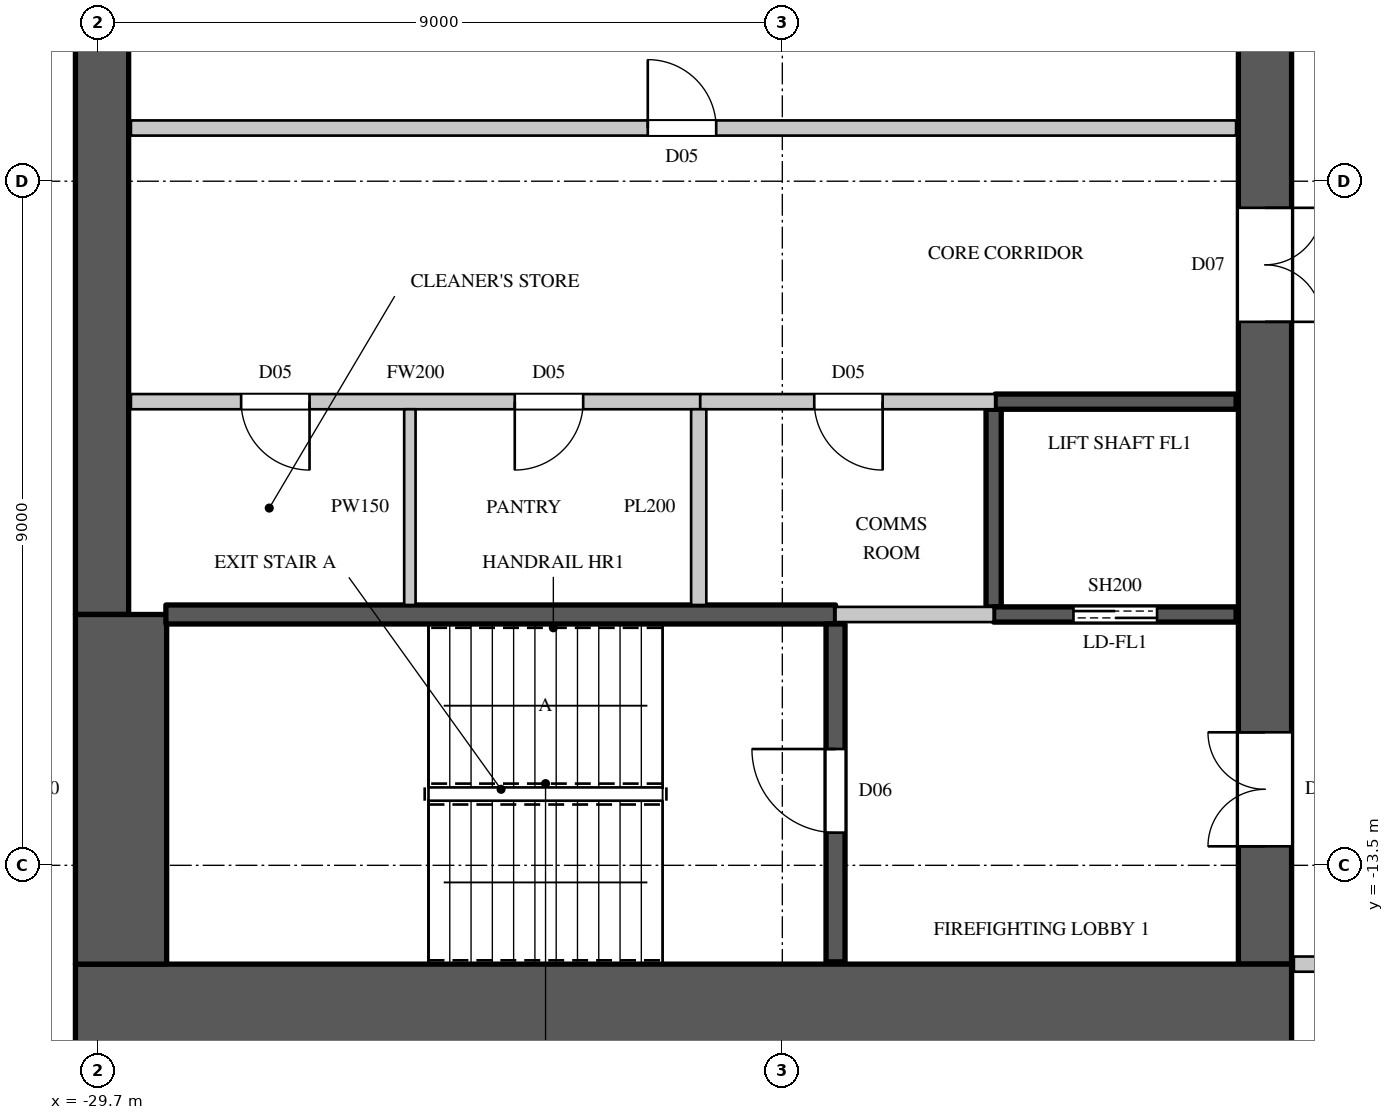
"""IFC4 building model, lengths in metres.
Left out: names, types, materials, properties, quantities, classifications, styles, units other than length and angle.
Written with IfcOpenShell. Run it as: python <this file> out.ifc"""

import sys

from ifc_helpers import new_model, si_unit, direction, frame, frame_2d, origin, place, context, subcontext, project, spatial, rectangle, extrude, element, fill, save


model = new_model("IFC4")
c1 = context("Model", 3, precision=1e-05, world=origin(), true_north=direction((0.0, 1.0)))
c2 = subcontext(c1, "Body", "Model", "MODEL_VIEW")
j1 = project(units=[si_unit("LENGTHUNIT", "METRE"), si_unit("PLANEANGLEUNIT", "RADIAN")], contexts=[c1])
p1 = place(None, origin())
s1 = spatial("IfcSite", under=j1, at=p1, CompositionType="ELEMENT")
p2 = place(p1, origin())
s2 = spatial("IfcBuilding", under=s1, at=p2, CompositionType="ELEMENT")
p3 = place(p2, frame((0.0, 0.0, 304.9)))
s3 = spatial("IfcBuildingStorey", under=s2, at=p3, CompositionType="ELEMENT", Elevation=304.9)
p4 = place(p3, frame((-30.0, -15.4, 0.0), z_axis=(0.0, 0.0, 1.0), x_axis=(1.0, 0.0, 0.0)))
e1 = element("IfcWall", 1, at=p4, inside=s3, PredefinedType="SHEAR", context=c2, shape_type="SweptSolid", body=[
    extrude(rectangle(XDim=16.0, YDim=1.2, at=frame_2d((8.0, 0.0))), origin(), (0.0, 0.0, 1.0), 4.1),
])
p5 = place(p3, frame((-14.35, -14.8, 0.0), z_axis=(0.0, 0.0, 1.0), x_axis=(0.0, 1.0, 0.0)))
e2 = element("IfcWall", 2, at=p5, inside=s3, PredefinedType="SHEAR", context=c2, shape_type="SweptSolid", body=[
    extrude(rectangle(XDim=29.6, YDim=0.7, at=frame_2d((14.8, 0.0))), origin(), (0.0, 0.0, 1.0), 4.1),
])
p6 = place(p5, frame((1.55, 0.0, 0.0)))
e3 = element("IfcOpeningElement", 3, at=p6, cuts=e2, PredefinedType="OPENING", context=c2, shape_type="SweptSolid", body=[
    extrude(rectangle(XDim=1.5, YDim=2.4, at=frame_2d((0.75, 1.2))), frame((0.0, 0.36, 0.0), z_axis=(0.0, -1.0, 0.0), x_axis=(1.0, 0.0, 0.0)), (0.0, 0.0, 1.0), 0.72),
])
p7 = place(p5, frame((26.55, 0.0, 0.0)))
e4 = element("IfcOpeningElement", 4, at=p7, cuts=e2, PredefinedType="OPENING", context=c2, shape_type="SweptSolid", body=[
    extrude(rectangle(XDim=1.5, YDim=2.4, at=frame_2d((0.75, 1.2))), frame((0.0, 0.36, 0.0), z_axis=(0.0, -1.0, 0.0), x_axis=(1.0, 0.0, 0.0)), (0.0, 0.0, 1.0), 0.72),
])
p8 = place(p5, frame((8.45, 0.0, 0.0)))
e5 = element("IfcOpeningElement", 5, at=p8, cuts=e2, PredefinedType="OPENING", context=c2, shape_type="SweptSolid", body=[
    extrude(rectangle(XDim=1.5, YDim=2.4, at=frame_2d((0.75, 1.2))), frame((0.0, 0.36, 0.0), z_axis=(0.0, -1.0, 0.0), x_axis=(1.0, 0.0, 0.0)), (0.0, 0.0, 1.0), 0.72),
])
p9 = place(p5, frame((19.65, 0.0, 0.0)))
e6 = element("IfcOpeningElement", 6, at=p9, cuts=e2, PredefinedType="OPENING", context=c2, shape_type="SweptSolid", body=[
    extrude(rectangle(XDim=1.5, YDim=2.4, at=frame_2d((0.75, 1.2))), frame((0.0, 0.36, 0.0), z_axis=(0.0, -1.0, 0.0), x_axis=(1.0, 0.0, 0.0)), (0.0, 0.0, 1.0), 0.72),
])
p10 = place(p5, frame((14.5, 0.0, 0.0)))
e7 = element("IfcOpeningElement", 7, at=p10, cuts=e2, PredefinedType="OPENING", context=c2, shape_type="SweptSolid", body=[
    extrude(rectangle(XDim=0.6, YDim=2.0, at=frame_2d((0.3, 1.0))), frame((0.0, 0.36, 0.0), z_axis=(0.0, -1.0, 0.0), x_axis=(1.0, 0.0, 0.0)), (0.0, 0.0, 1.0), 0.72),
])
p11 = place(p3, frame((-29.65, -10.2, 0.0), z_axis=(0.0, 0.0, 1.0), x_axis=(0.0, 1.0, 0.0)))
e8 = element("IfcWall", 8, at=p11, inside=s3, PredefinedType="SHEAR", context=c2, shape_type="SweptSolid", body=[
    extrude(rectangle(XDim=20.4, YDim=0.7, at=frame_2d((10.2, 0.0))), origin(), (0.0, 0.0, 1.0), 4.1),
])
p12 = place(p3, frame((-29.4, -14.8, 0.0), z_axis=(0.0, 0.0, 1.0), x_axis=(0.0, 1.0, 0.0)))
e9 = element("IfcWall", 9, at=p12, inside=s3, PredefinedType="SHEAR", context=c2, shape_type="SweptSolid", body=[
    extrude(rectangle(XDim=4.6, YDim=1.2, at=frame_2d((2.3, 0.0))), origin(), (0.0, 0.0, 1.0), 4.1),
])
p13 = place(p3, frame((-29.27, -7.4, 0.0), z_axis=(0.0, 0.0, 1.0), x_axis=(1.0, 0.0, 0.0)))
e10 = element("IfcWall", 10, at=p13, inside=s3, PredefinedType="PARTITIONING", context=c2, shape_type="SweptSolid", body=[
    extrude(rectangle(XDim=7.49, YDim=0.2, at=frame_2d((3.745, 0.0))), origin(), (0.0, 0.0, 1.0), 3.8),
])
p14 = place(p13, frame((1.45, 0.0, 0.0)))
e11 = element("IfcOpeningElement", 11, at=p14, cuts=e10, PredefinedType="OPENING", context=c2, shape_type="SweptSolid", body=[
    extrude(rectangle(XDim=0.9, YDim=2.2, at=frame_2d((0.45, 1.1))), frame((0.0, 0.11, 0.0), z_axis=(0.0, -1.0, 0.0), x_axis=(1.0, 0.0, 0.0)), (0.0, 0.0, 1.0), 0.22),
])
p15 = place(p13, frame((5.05, 0.0, 0.0)))
e12 = element("IfcOpeningElement", 12, at=p15, cuts=e10, PredefinedType="OPENING", context=c2, shape_type="SweptSolid", body=[
    extrude(rectangle(XDim=0.9, YDim=2.2, at=frame_2d((0.45, 1.1))), frame((0.0, 0.11, 0.0), z_axis=(0.0, -1.0, 0.0), x_axis=(1.0, 0.0, 0.0)), (0.0, 0.0, 1.0), 0.22),
])
p16 = place(p3, frame((-29.27, -3.8, 0.0), z_axis=(0.0, 0.0, 1.0), x_axis=(1.0, 0.0, 0.0)))
e13 = element("IfcWall", 13, at=p16, inside=s3, PredefinedType="PARTITIONING", context=c2, shape_type="SweptSolid", body=[
    extrude(rectangle(XDim=14.54, YDim=0.2, at=frame_2d((7.27, 0.0))), origin(), (0.0, 0.0, 1.0), 3.8),
])
p17 = place(p16, frame((6.8, 0.0, 0.0)))
e14 = element("IfcOpeningElement", 14, at=p17, cuts=e13, PredefinedType="OPENING", context=c2, shape_type="SweptSolid", body=[
    extrude(rectangle(XDim=0.9, YDim=2.2, at=frame_2d((0.45, 1.1))), frame((0.0, 0.11, 0.0), z_axis=(0.0, -1.0, 0.0), x_axis=(1.0, 0.0, 0.0)), (0.0, 0.0, 1.0), 0.22),
])
p18 = place(p3, frame((-13.97, -14.8, 0.0), z_axis=(0.0, 0.0, 1.0), x_axis=(1.0, 0.0, 0.0)))
e15 = element("IfcWall", 15, at=p18, inside=s3, PredefinedType="PARTITIONING", context=c2, shape_type="SweptSolid", body=[
    extrude(rectangle(XDim=2.87, YDim=0.2, at=frame_2d((1.435, 0.0))), origin(), (0.0, 0.0, 1.0), 3.8),
])
p19 = place(p3, frame((-25.6, -10.075, 0.0), z_axis=(0.0, 0.0, 1.0), x_axis=(0.0, 1.0, 0.0)))
e16 = element("IfcWall", 16, at=p19, inside=s3, PredefinedType="PARTITIONING", context=c2, shape_type="SweptSolid", body=[
    extrude(rectangle(XDim=2.575, YDim=0.15, at=frame_2d((1.288, 0.0))), origin(), (0.0, 0.0, 1.0), 3.8),
])
p20 = place(p3, frame((-21.78, -7.4, 0.0), z_axis=(0.0, 0.0, 1.0), x_axis=(1.0, 0.0, 0.0)))
e17 = element("IfcWall", 17, at=p20, inside=s3, PredefinedType="PARTITIONING", context=c2, shape_type="SweptSolid", body=[
    extrude(rectangle(XDim=3.88, YDim=0.2, at=frame_2d((1.94, 0.0))), origin(), (0.0, 0.0, 1.0), 3.8),
])
p21 = place(p20, frame((1.5, 0.0, 0.0)))
e18 = element("IfcOpeningElement", 18, at=p21, cuts=e17, PredefinedType="OPENING", context=c2, shape_type="SweptSolid", body=[
    extrude(rectangle(XDim=0.9, YDim=2.2, at=frame_2d((0.45, 1.1))), frame((0.0, 0.11, 0.0), z_axis=(0.0, -1.0, 0.0), x_axis=(1.0, 0.0, 0.0)), (0.0, 0.0, 1.0), 0.22),
])
p22 = place(p3, frame((-21.8, -10.075, 0.0), z_axis=(0.0, 0.0, 1.0), x_axis=(0.0, 1.0, 0.0)))
e19 = element("IfcWall", 19, at=p22, inside=s3, PredefinedType="PARTITIONING", context=c2, shape_type="SweptSolid", body=[
    extrude(rectangle(XDim=2.575, YDim=0.2, at=frame_2d((1.288, 0.0))), origin(), (0.0, 0.0, 1.0), 3.8),
])
p23 = place(p3, frame((-20.0, -10.2, 0.0), z_axis=(0.0, 0.0, 1.0), x_axis=(1.0, 0.0, 0.0)))
e20 = element("IfcWall", 20, at=p23, inside=s3, PredefinedType="PARTITIONING", context=c2, shape_type="SweptSolid", body=[
    extrude(rectangle(XDim=2.08, YDim=0.2, at=frame_2d((1.04, 0.0))), origin(), (0.0, 0.0, 1.0), 3.8),
])
p24 = place(p3, frame((-17.92, -10.1, 0.0), z_axis=(0.0, 0.0, 1.0), x_axis=(0.0, 1.0, 0.0)))
e21 = element("IfcWall", 21, at=p24, inside=s3, PredefinedType="SHEAR", context=c2, shape_type="SweptSolid", body=[
    extrude(rectangle(XDim=2.6, YDim=0.2, at=frame_2d((1.3, 0.0))), origin(), (0.0, 0.0, 1.0), 3.8),
])
p25 = place(p3, frame((-17.92, -10.2, 0.0), z_axis=(0.0, 0.0, 1.0), x_axis=(1.0, 0.0, 0.0)))
e22 = element("IfcWall", 22, at=p25, inside=s3, PredefinedType="SHEAR", context=c2, shape_type="SweptSolid", body=[
    extrude(rectangle(XDim=3.19, YDim=0.2, at=frame_2d((1.595, 0.0))), origin(), (0.0, 0.0, 1.0), 3.8),
])
p26 = place(p25, frame((1.05, 0.0, 0.0)))
e23 = element("IfcOpeningElement", 23, at=p26, cuts=e22, PredefinedType="OPENING", context=c2, shape_type="SweptSolid", body=[
    extrude(rectangle(XDim=1.1, YDim=2.2, at=frame_2d((0.55, 1.1))), frame((0.0, 0.11, 0.0), z_axis=(0.0, -1.0, 0.0), x_axis=(1.0, 0.0, 0.0)), (0.0, 0.0, 1.0), 0.22),
])
p27 = place(p3, frame((-17.9, -7.4, 0.0), z_axis=(0.0, 0.0, 1.0), x_axis=(1.0, 0.0, 0.0)))
e24 = element("IfcWall", 24, at=p27, inside=s3, PredefinedType="SHEAR", context=c2, shape_type="SweptSolid", body=[
    extrude(rectangle(XDim=3.17, YDim=0.2, at=frame_2d((1.585, 0.0))), origin(), (0.0, 0.0, 1.0), 3.8),
])
p28 = place(p3, frame((-28.81, -10.2, 0.0), z_axis=(0.0, 0.0, 1.0), x_axis=(1.0, 0.0, 0.0)))
e25 = element("IfcWall", 25, at=p28, inside=s3, PredefinedType="SHEAR", context=c2, shape_type="SweptSolid", body=[
    extrude(rectangle(XDim=8.81, YDim=0.25, at=frame_2d((4.405, 0.0))), origin(), (0.0, 0.0, 1.0), 3.8),
])
p29 = place(p3, frame((-20.0, -14.77, 0.0), z_axis=(0.0, 0.0, 1.0), x_axis=(0.0, 1.0, 0.0)))
e26 = element("IfcWall", 26, at=p29, inside=s3, PredefinedType="SHEAR", context=c2, shape_type="SweptSolid", body=[
    extrude(rectangle(XDim=4.445, YDim=0.25, at=frame_2d((2.223, 0.0))), origin(), (0.0, 0.0, 1.0), 3.8),
])
p30 = place(p29, frame((1.7, 0.0, 0.0)))
e27 = element("IfcOpeningElement", 27, at=p30, cuts=e26, PredefinedType="OPENING", context=c2, shape_type="SweptSolid", body=[
    extrude(rectangle(XDim=1.1, YDim=2.2, at=frame_2d((0.55, 1.1))), frame((0.0, 0.135, 0.0), z_axis=(0.0, -1.0, 0.0), x_axis=(1.0, 0.0, 0.0)), (0.0, 0.0, 1.0), 0.27),
])
p31 = place(p30, origin())
e28 = element("IfcDoor", 28, at=p31, inside=s3, OperationType="SINGLE_SWING_RIGHT", PredefinedType="DOOR", context=c2, shape_type="SweptSolid", body=[
    extrude(rectangle(XDim=1.1, YDim=2.2, at=frame_2d((0.55, 1.1))), frame((0.0, 0.025, 0.0), z_axis=(0.0, -1.0, 0.0), x_axis=(1.0, 0.0, 0.0)), (0.0, 0.0, 1.0), 0.05),
])
fill(e27, e28)
p32 = place(p14, origin())
e29 = element("IfcDoor", 29, at=p32, inside=s3, OperationType="SINGLE_SWING_LEFT", PredefinedType="DOOR", context=c2, shape_type="SweptSolid", body=[
    extrude(rectangle(XDim=0.9, YDim=2.2, at=frame_2d((0.45, 1.1))), frame((0.0, 0.025, 0.0), z_axis=(0.0, -1.0, 0.0), x_axis=(1.0, 0.0, 0.0)), (0.0, 0.0, 1.0), 0.05),
])
fill(e11, e29)
p33 = place(p15, origin())
e30 = element("IfcDoor", 30, at=p33, inside=s3, OperationType="SINGLE_SWING_RIGHT", PredefinedType="DOOR", context=c2, shape_type="SweptSolid", body=[
    extrude(rectangle(XDim=0.9, YDim=2.2, at=frame_2d((0.45, 1.1))), frame((0.0, 0.025, 0.0), z_axis=(0.0, -1.0, 0.0), x_axis=(1.0, 0.0, 0.0)), (0.0, 0.0, 1.0), 0.05),
])
fill(e12, e30)
p34 = place(p21, origin())
e31 = element("IfcDoor", 31, at=p34, inside=s3, OperationType="SINGLE_SWING_LEFT", PredefinedType="DOOR", context=c2, shape_type="SweptSolid", body=[
    extrude(rectangle(XDim=0.9, YDim=2.2, at=frame_2d((0.45, 1.1))), frame((0.0, 0.025, 0.0), z_axis=(0.0, -1.0, 0.0), x_axis=(1.0, 0.0, 0.0)), (0.0, 0.0, 1.0), 0.05),
])
fill(e18, e31)
p35 = place(p17, origin())
e32 = element("IfcDoor", 32, at=p35, inside=s3, OperationType="SINGLE_SWING_LEFT", PredefinedType="DOOR", context=c2, shape_type="SweptSolid", body=[
    extrude(rectangle(XDim=0.9, YDim=2.2, at=frame_2d((0.45, 1.1))), frame((0.0, 0.025, 0.0), z_axis=(0.0, -1.0, 0.0), x_axis=(1.0, 0.0, 0.0)), (0.0, 0.0, 1.0), 0.05),
])
fill(e14, e32)
p36 = place(p26, origin())
e33 = element("IfcDoor", 33, at=p36, inside=s3, OperationType="DOUBLE_DOOR_SLIDING", PredefinedType="DOOR", context=c2, shape_type="SweptSolid", body=[
    extrude(rectangle(XDim=1.1, YDim=2.2, at=frame_2d((0.55, 1.1))), frame((0.0, 0.025, 0.0), z_axis=(0.0, -1.0, 0.0), x_axis=(1.0, 0.0, 0.0)), (0.0, 0.0, 1.0), 0.05),
])
fill(e23, e33)
p37 = place(p6, origin())
e34 = element("IfcDoor", 34, at=p37, inside=s3, OperationType="DOUBLE_DOOR_SINGLE_SWING", PredefinedType="DOOR", context=c2, shape_type="SweptSolid", body=[
    extrude(rectangle(XDim=1.5, YDim=2.4, at=frame_2d((0.75, 1.2))), frame((0.0, 0.345, 0.0), z_axis=(0.0, -1.0, 0.0), x_axis=(1.0, 0.0, 0.0)), (0.0, 0.0, 1.0), 0.05),
])
fill(e3, e34)
p38 = place(p8, origin())
e35 = element("IfcDoor", 35, at=p38, inside=s3, OperationType="DOUBLE_DOOR_SINGLE_SWING", PredefinedType="DOOR", context=c2, shape_type="SweptSolid", body=[
    extrude(rectangle(XDim=1.5, YDim=2.4, at=frame_2d((0.75, 1.2))), frame((0.0, -0.295, 0.0), z_axis=(0.0, -1.0, 0.0), x_axis=(1.0, 0.0, 0.0)), (0.0, 0.0, 1.0), 0.05),
])
fill(e5, e35)
save(model, sys.argv[1])
